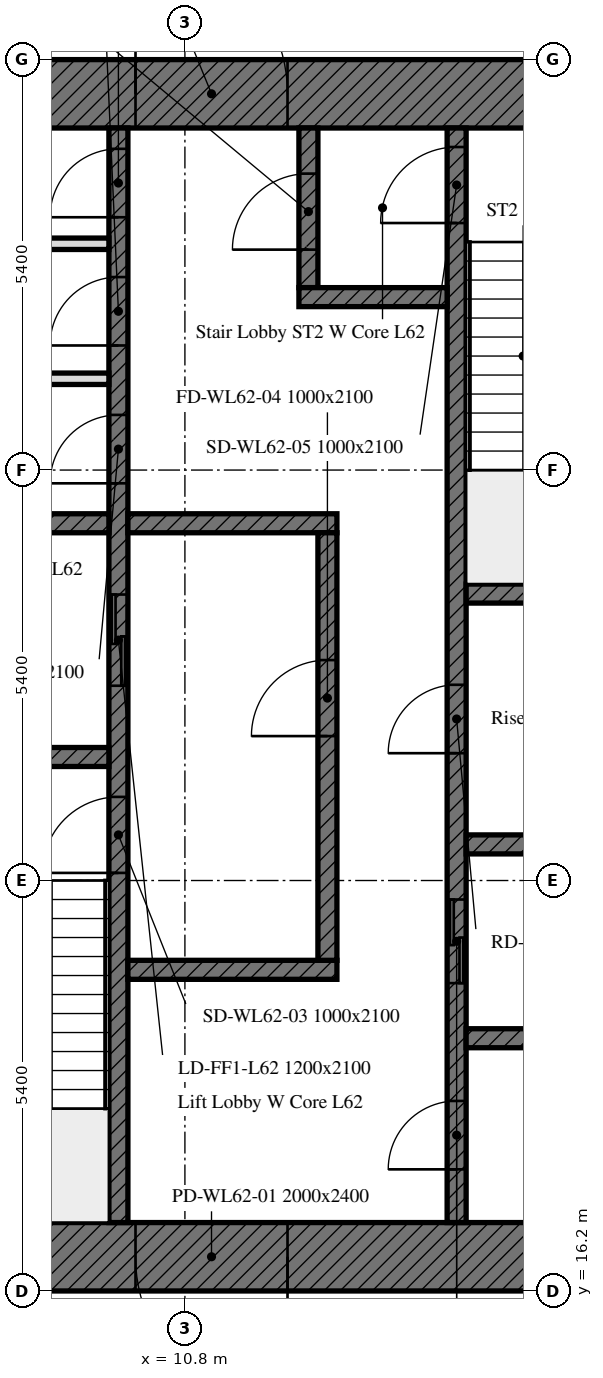
"""IFC4 building model, lengths in metres.
Left out: names, types, materials, properties, quantities, classifications, styles, units other than length and angle.
Written with IfcOpenShell. Run it as: python <this file> out.ifc"""

import sys

from ifc_helpers import new_model, si_unit, direction, frame, frame_2d, origin, place, context, subcontext, project, spatial, rectangle, extrude, element, fill, save


model = new_model("IFC4")
c1 = context("Model", 3, precision=1e-05, world=origin(), true_north=direction((0.0, 1.0)))
c2 = subcontext(c1, "Body", "Model", "MODEL_VIEW")
j1 = project(units=[si_unit("LENGTHUNIT", "METRE"), si_unit("PLANEANGLEUNIT", "RADIAN")], contexts=[c1])
p1 = place(None, origin())
s1 = spatial("IfcSite", under=j1, at=p1, CompositionType="ELEMENT")
p2 = place(p1, origin())
s2 = spatial("IfcBuilding", under=s1, at=p2, CompositionType="ELEMENT")
p3 = place(p2, frame((0.0, 0.0, 255.7)))
s3 = spatial("IfcBuildingStorey", under=s2, at=p3, CompositionType="ELEMENT", Elevation=255.7)
p4 = place(p3, frame((17.7, 16.65, 0.0), z_axis=(0.0, 0.0, 1.0), x_axis=(-1.0, 0.0, 0.0)))
e1 = element("IfcWall", 1, at=p4, inside=s3, PredefinedType="SOLIDWALL", context=c2, shape_type="SweptSolid", body=[
    extrude(rectangle(XDim=11.1, YDim=0.9, at=frame_2d((5.55, 0.0))), origin(), (0.0, 0.0, 1.0), 4.5),
])
p5 = place(p4, frame((5.55, 0.0, 0.0)))
e2 = element("IfcOpeningElement", 2, at=p5, cuts=e1, PredefinedType="OPENING", context=c2, shape_type="SweptSolid", body=[
    extrude(rectangle(XDim=2.0, YDim=2.4, at=frame_2d((1.0, 1.2))), frame((0.0, 0.45, 0.0), z_axis=(0.0, -1.0, 0.0), x_axis=(1.0, 0.0, 0.0)), (0.0, 0.0, 1.0), 0.9),
])
p6 = place(p3, frame((6.6, 31.95, 0.0), z_axis=(0.0, 0.0, 1.0), x_axis=(1.0, 0.0, 0.0)))
e3 = element("IfcWall", 3, at=p6, inside=s3, PredefinedType="SOLIDWALL", context=c2, shape_type="SweptSolid", body=[
    extrude(rectangle(XDim=11.1, YDim=0.9, at=frame_2d((5.55, 0.0))), origin(), (0.0, 0.0, 1.0), 4.5),
])
p7 = place(p6, frame((3.55, 0.0, 0.0)))
e4 = element("IfcOpeningElement", 4, at=p7, cuts=e3, PredefinedType="OPENING", context=c2, shape_type="SweptSolid", body=[
    extrude(rectangle(XDim=2.0, YDim=2.4, at=frame_2d((1.0, 1.2))), frame((0.0, 0.45, 0.0), z_axis=(0.0, -1.0, 0.0), x_axis=(1.0, 0.0, 0.0)), (0.0, 0.0, 1.0), 0.9),
])
p8 = place(p3, frame((9.925, 17.1, 0.0), z_axis=(0.0, 0.0, 1.0), x_axis=(0.0, 1.0, 0.0)))
e5 = element("IfcWall", 5, at=p8, inside=s3, PredefinedType="SOLIDWALL", context=c2, shape_type="SweptSolid", body=[
    extrude(rectangle(XDim=14.4, YDim=0.25, at=frame_2d((7.2, 0.0))), origin(), (0.0, 0.0, 1.0), 4.5),
])
p9 = place(p8, frame((4.6, 0.0, 0.0)))
e6 = element("IfcOpeningElement", 6, at=p9, cuts=e5, PredefinedType="OPENING", context=c2, shape_type="SweptSolid", body=[
    extrude(rectangle(XDim=1.0, YDim=2.1, at=frame_2d((0.5, 1.05))), frame((0.0, 0.125, 0.0), z_axis=(0.0, -1.0, 0.0), x_axis=(1.0, 0.0, 0.0)), (0.0, 0.0, 1.0), 0.25),
])
p10 = place(p8, frame((7.062, 0.0, 0.0)))
e7 = element("IfcOpeningElement", 7, at=p10, cuts=e5, PredefinedType="OPENING", context=c2, shape_type="SweptSolid", body=[
    extrude(rectangle(XDim=1.2, YDim=2.1, at=frame_2d((0.6, 1.05))), frame((0.0, 0.125, 0.0), z_axis=(0.0, -1.0, 0.0), x_axis=(1.0, 0.0, 0.0)), (0.0, 0.0, 1.0), 0.25),
])
p11 = place(p8, frame((9.726, 0.0, 0.0)))
e8 = element("IfcOpeningElement", 8, at=p11, cuts=e5, PredefinedType="OPENING", context=c2, shape_type="SweptSolid", body=[
    extrude(rectangle(XDim=0.9, YDim=2.1, at=frame_2d((0.45, 1.05))), frame((0.0, 0.125, 0.0), z_axis=(0.0, -1.0, 0.0), x_axis=(1.0, 0.0, 0.0)), (0.0, 0.0, 1.0), 0.25),
])
p12 = place(p8, frame((11.539, 0.0, 0.0)))
e9 = element("IfcOpeningElement", 9, at=p12, cuts=e5, PredefinedType="OPENING", context=c2, shape_type="SweptSolid", body=[
    extrude(rectangle(XDim=0.9, YDim=2.1, at=frame_2d((0.45, 1.05))), frame((0.0, 0.125, 0.0), z_axis=(0.0, -1.0, 0.0), x_axis=(1.0, 0.0, 0.0)), (0.0, 0.0, 1.0), 0.25),
])
p13 = place(p8, frame((13.226, 0.0, 0.0)))
e10 = element("IfcOpeningElement", 10, at=p13, cuts=e5, PredefinedType="OPENING", context=c2, shape_type="SweptSolid", body=[
    extrude(rectangle(XDim=0.9, YDim=2.1, at=frame_2d((0.45, 1.05))), frame((0.0, 0.125, 0.0), z_axis=(0.0, -1.0, 0.0), x_axis=(1.0, 0.0, 0.0)), (0.0, 0.0, 1.0), 0.25),
])
p14 = place(p3, frame((14.375, 17.1, 0.0), z_axis=(0.0, 0.0, 1.0), x_axis=(0.0, 1.0, 0.0)))
e11 = element("IfcWall", 11, at=p14, inside=s3, PredefinedType="SOLIDWALL", context=c2, shape_type="SweptSolid", body=[
    extrude(rectangle(XDim=14.4, YDim=0.25, at=frame_2d((7.2, 0.0))), origin(), (0.0, 0.0, 1.0), 4.5),
])
p15 = place(p14, frame((13.15, 0.0, 0.0)))
e12 = element("IfcOpeningElement", 12, at=p15, cuts=e11, PredefinedType="OPENING", context=c2, shape_type="SweptSolid", body=[
    extrude(rectangle(XDim=1.0, YDim=2.1, at=frame_2d((0.5, 1.05))), frame((0.0, 0.125, 0.0), z_axis=(0.0, -1.0, 0.0), x_axis=(1.0, 0.0, 0.0)), (0.0, 0.0, 1.0), 0.25),
])
p16 = place(p14, frame((3.15, 0.0, 0.0)))
e13 = element("IfcOpeningElement", 13, at=p16, cuts=e11, PredefinedType="OPENING", context=c2, shape_type="SweptSolid", body=[
    extrude(rectangle(XDim=1.1, YDim=2.1, at=frame_2d((0.55, 1.05))), frame((0.0, 0.125, 0.0), z_axis=(0.0, -1.0, 0.0), x_axis=(1.0, 0.0, 0.0)), (0.0, 0.0, 1.0), 0.25),
])
p17 = place(p14, frame((0.7, 0.0, 0.0)))
e14 = element("IfcOpeningElement", 14, at=p17, cuts=e11, PredefinedType="OPENING", context=c2, shape_type="SweptSolid", body=[
    extrude(rectangle(XDim=0.9, YDim=2.1, at=frame_2d((0.45, 1.05))), frame((0.0, 0.125, 0.0), z_axis=(0.0, -1.0, 0.0), x_axis=(1.0, 0.0, 0.0)), (0.0, 0.0, 1.0), 0.25),
])
p18 = place(p14, frame((6.175, 0.0, 0.0)))
e15 = element("IfcOpeningElement", 15, at=p18, cuts=e11, PredefinedType="OPENING", context=c2, shape_type="SweptSolid", body=[
    extrude(rectangle(XDim=0.9, YDim=2.1, at=frame_2d((0.45, 1.05))), frame((0.0, 0.125, 0.0), z_axis=(0.0, -1.0, 0.0), x_axis=(1.0, 0.0, 0.0)), (0.0, 0.0, 1.0), 0.25),
])
for number, where, z_axis, x_axis in (
    (16, (6.6, 23.225, 0.0), (0.0, 0.0, 1.0), (1.0, 0.0, 0.0)),
    (17, (14.5, 25.375, 0.0), (0.0, 0.0, 1.0), (1.0, 0.0, 0.0)),
    (18, (14.5, 22.075, 0.0), (0.0, 0.0, 1.0), (1.0, 0.0, 0.0)),
    (19, (6.6, 26.3, 0.0), (0.0, 0.0, 1.0), (1.0, 0.0, 0.0)),
):
    element("IfcWall", number, at=place(p3, frame(where, z_axis=z_axis, x_axis=x_axis)), inside=s3, PredefinedType="SOLIDWALL", context=c2, shape_type="SweptSolid", body=[
        extrude(rectangle(XDim=3.2, YDim=0.25, at=frame_2d((1.6, 0.0))), origin(), (0.0, 0.0, 1.0), 4.5),
    ])
for number, where, z_axis, x_axis in (
    (20, (10.05, 26.3, 0.0), (0.0, 0.0, 1.0), (1.0, 0.0, 0.0)),
    (21, (10.05, 20.425, 0.0), (0.0, 0.0, 1.0), (1.0, 0.0, 0.0)),
):
    element("IfcWall", number, at=place(p3, frame(where, z_axis=z_axis, x_axis=x_axis)), inside=s3, PredefinedType="SOLIDWALL", context=c2, shape_type="SweptSolid", body=[
        extrude(rectangle(XDim=2.75, YDim=0.25, at=frame_2d((1.375, 0.0))), origin(), (0.0, 0.0, 1.0), 4.5),
    ])
p19 = place(p3, frame((12.425, 29.4, 0.0), z_axis=(0.0, 0.0, 1.0), x_axis=(0.0, 1.0, 0.0)))
e22 = element("IfcWall", 22, at=p19, inside=s3, PredefinedType="SOLIDWALL", context=c2, shape_type="SweptSolid", body=[
    extrude(rectangle(XDim=2.1, YDim=0.25, at=frame_2d((1.05, 0.0))), origin(), (0.0, 0.0, 1.0), 4.5),
])
p20 = place(p19, frame((0.5, 0.0, 0.0)))
e23 = element("IfcOpeningElement", 23, at=p20, cuts=e22, PredefinedType="OPENING", context=c2, shape_type="SweptSolid", body=[
    extrude(rectangle(XDim=1.0, YDim=2.1, at=frame_2d((0.5, 1.05))), frame((0.0, 0.125, 0.0), z_axis=(0.0, -1.0, 0.0), x_axis=(1.0, 0.0, 0.0)), (0.0, 0.0, 1.0), 0.25),
])
p21 = place(p3, frame((12.3, 29.275, 0.0), z_axis=(0.0, 0.0, 1.0), x_axis=(1.0, 0.0, 0.0)))
e24 = element("IfcWall", 24, at=p21, inside=s3, PredefinedType="SOLIDWALL", context=c2, shape_type="SweptSolid", body=[
    extrude(rectangle(XDim=1.95, YDim=0.25, at=frame_2d((0.975, 0.0))), origin(), (0.0, 0.0, 1.0), 4.5),
])
p22 = place(p3, frame((12.675, 20.55, 0.0), z_axis=(0.0, 0.0, 1.0), x_axis=(0.0, 1.0, 0.0)))
e25 = element("IfcWall", 25, at=p22, inside=s3, PredefinedType="SOLIDWALL", context=c2, shape_type="SweptSolid", body=[
    extrude(rectangle(XDim=5.625, YDim=0.25, at=frame_2d((2.812, 0.0))), origin(), (0.0, 0.0, 1.0), 4.5),
])
p23 = place(p22, frame((2.95, 0.0, 0.0)))
e26 = element("IfcOpeningElement", 26, at=p23, cuts=e25, PredefinedType="OPENING", context=c2, shape_type="SweptSolid", body=[
    extrude(rectangle(XDim=1.0, YDim=2.1, at=frame_2d((0.5, 1.05))), frame((0.0, 0.125, 0.0), z_axis=(0.0, -1.0, 0.0), x_axis=(1.0, 0.0, 0.0)), (0.0, 0.0, 1.0), 0.25),
])
p24 = place(p3, frame((14.5, 19.525, 0.0), z_axis=(0.0, 0.0, 1.0), x_axis=(1.0, 0.0, 0.0)))
e27 = element("IfcWall", 27, at=p24, inside=s3, PredefinedType="SOLIDWALL", context=c2, shape_type="SweptSolid", body=[
    extrude(rectangle(XDim=3.2, YDim=0.25, at=frame_2d((1.6, 0.0))), origin(), (0.0, 0.0, 1.0), 4.5),
])
for number, where, z_axis, x_axis in (
    (28, (6.6, 28.201, 0.0), (0.0, 0.0, 1.0), (1.0, 0.0, 0.0)),
    (29, (6.6, 29.977, 0.0), (0.0, 0.0, 1.0), (1.0, 0.0, 0.0)),
):
    element("IfcWall", number, at=place(p3, frame(where, z_axis=z_axis, x_axis=x_axis)), inside=s3, PredefinedType="PARTITIONING", context=c2, shape_type="SweptSolid", body=[
        extrude(rectangle(XDim=3.2, YDim=0.15, at=frame_2d((1.6, 0.0))), origin(), (0.0, 0.0, 1.0), 4.5),
    ])
p25 = place(p5, origin())
e30 = element("IfcDoor", 30, at=p25, inside=s3, OperationType="DOUBLE_DOOR_SINGLE_SWING", PredefinedType="DOOR", context=c2, shape_type="SweptSolid", body=[
    extrude(rectangle(XDim=2.0, YDim=2.4, at=frame_2d((1.0, 1.2))), frame((0.0, 0.025, 0.0), z_axis=(0.0, -1.0, 0.0), x_axis=(1.0, 0.0, 0.0)), (0.0, 0.0, 1.0), 0.05),
])
fill(e2, e30)
p26 = place(p7, origin())
e31 = element("IfcDoor", 31, at=p26, inside=s3, OperationType="DOUBLE_DOOR_SINGLE_SWING", PredefinedType="DOOR", context=c2, shape_type="SweptSolid", body=[
    extrude(rectangle(XDim=2.0, YDim=2.4, at=frame_2d((1.0, 1.2))), frame((0.0, 0.025, 0.0), z_axis=(0.0, -1.0, 0.0), x_axis=(1.0, 0.0, 0.0)), (0.0, 0.0, 1.0), 0.05),
])
fill(e4, e31)
p27 = place(p9, origin())
e32 = element("IfcDoor", 32, at=p27, inside=s3, OperationType="SINGLE_SWING_LEFT", PredefinedType="DOOR", context=c2, shape_type="SweptSolid", body=[
    extrude(rectangle(XDim=1.0, YDim=2.1, at=frame_2d((0.5, 1.05))), frame((0.0, 0.025, 0.0), z_axis=(0.0, -1.0, 0.0), x_axis=(1.0, 0.0, 0.0)), (0.0, 0.0, 1.0), 0.05),
])
fill(e6, e32)
p28 = place(p23, origin())
e33 = element("IfcDoor", 33, at=p28, inside=s3, OperationType="SINGLE_SWING_LEFT", PredefinedType="DOOR", context=c2, shape_type="SweptSolid", body=[
    extrude(rectangle(XDim=1.0, YDim=2.1, at=frame_2d((0.5, 1.05))), frame((0.0, 0.025, 0.0), z_axis=(0.0, -1.0, 0.0), x_axis=(1.0, 0.0, 0.0)), (0.0, 0.0, 1.0), 0.05),
])
fill(e26, e33)
p29 = place(p15, origin())
e34 = element("IfcDoor", 34, at=p29, inside=s3, OperationType="SINGLE_SWING_LEFT", PredefinedType="DOOR", context=c2, shape_type="SweptSolid", body=[
    extrude(rectangle(XDim=1.0, YDim=2.1, at=frame_2d((0.5, 1.05))), frame((0.0, 0.025, 0.0), z_axis=(0.0, -1.0, 0.0), x_axis=(1.0, 0.0, 0.0)), (0.0, 0.0, 1.0), 0.05),
])
fill(e12, e34)
p30 = place(p20, origin())
e35 = element("IfcDoor", 35, at=p30, inside=s3, OperationType="SINGLE_SWING_LEFT", PredefinedType="DOOR", context=c2, shape_type="SweptSolid", body=[
    extrude(rectangle(XDim=1.0, YDim=2.1, at=frame_2d((0.5, 1.05))), frame((0.0, 0.025, 0.0), z_axis=(0.0, -1.0, 0.0), x_axis=(1.0, 0.0, 0.0)), (0.0, 0.0, 1.0), 0.05),
])
fill(e23, e35)
p31 = place(p10, origin())
e36 = element("IfcDoor", 36, at=p31, inside=s3, OperationType="DOUBLE_DOOR_SLIDING", PredefinedType="DOOR", context=c2, shape_type="SweptSolid", body=[
    extrude(rectangle(XDim=1.2, YDim=2.1, at=frame_2d((0.6, 1.05))), frame((0.0, 0.025, 0.0), z_axis=(0.0, -1.0, 0.0), x_axis=(1.0, 0.0, 0.0)), (0.0, 0.0, 1.0), 0.05),
])
fill(e7, e36)
p32 = place(p16, origin())
e37 = element("IfcDoor", 37, at=p32, inside=s3, OperationType="DOUBLE_DOOR_SLIDING", PredefinedType="DOOR", context=c2, shape_type="SweptSolid", body=[
    extrude(rectangle(XDim=1.1, YDim=2.1, at=frame_2d((0.55, 1.05))), frame((0.0, 0.025, 0.0), z_axis=(0.0, -1.0, 0.0), x_axis=(1.0, 0.0, 0.0)), (0.0, 0.0, 1.0), 0.05),
])
fill(e13, e37)
p33 = place(p11, origin())
e38 = element("IfcDoor", 38, at=p33, inside=s3, OperationType="SINGLE_SWING_LEFT", PredefinedType="DOOR", context=c2, shape_type="SweptSolid", body=[
    extrude(rectangle(XDim=0.9, YDim=2.1, at=frame_2d((0.45, 1.05))), frame((0.0, 0.025, 0.0), z_axis=(0.0, -1.0, 0.0), x_axis=(1.0, 0.0, 0.0)), (0.0, 0.0, 1.0), 0.05),
])
fill(e8, e38)
p34 = place(p12, origin())
e39 = element("IfcDoor", 39, at=p34, inside=s3, OperationType="SINGLE_SWING_LEFT", PredefinedType="DOOR", context=c2, shape_type="SweptSolid", body=[
    extrude(rectangle(XDim=0.9, YDim=2.1, at=frame_2d((0.45, 1.05))), frame((0.0, 0.025, 0.0), z_axis=(0.0, -1.0, 0.0), x_axis=(1.0, 0.0, 0.0)), (0.0, 0.0, 1.0), 0.05),
])
fill(e9, e39)
p35 = place(p13, origin())
e40 = element("IfcDoor", 40, at=p35, inside=s3, OperationType="SINGLE_SWING_LEFT", PredefinedType="DOOR", context=c2, shape_type="SweptSolid", body=[
    extrude(rectangle(XDim=0.9, YDim=2.1, at=frame_2d((0.45, 1.05))), frame((0.0, 0.025, 0.0), z_axis=(0.0, -1.0, 0.0), x_axis=(1.0, 0.0, 0.0)), (0.0, 0.0, 1.0), 0.05),
])
fill(e10, e40)
p36 = place(p17, origin())
e41 = element("IfcDoor", 41, at=p36, inside=s3, OperationType="SINGLE_SWING_LEFT", PredefinedType="DOOR", context=c2, shape_type="SweptSolid", body=[
    extrude(rectangle(XDim=0.9, YDim=2.1, at=frame_2d((0.45, 1.05))), frame((0.0, 0.025, 0.0), z_axis=(0.0, -1.0, 0.0), x_axis=(1.0, 0.0, 0.0)), (0.0, 0.0, 1.0), 0.05),
])
fill(e14, e41)
p37 = place(p18, origin())
e42 = element("IfcDoor", 42, at=p37, inside=s3, OperationType="SINGLE_SWING_LEFT", PredefinedType="DOOR", context=c2, shape_type="SweptSolid", body=[
    extrude(rectangle(XDim=0.9, YDim=2.1, at=frame_2d((0.45, 1.05))), frame((0.0, 0.025, 0.0), z_axis=(0.0, -1.0, 0.0), x_axis=(1.0, 0.0, 0.0)), (0.0, 0.0, 1.0), 0.05),
])
fill(e15, e42)
save(model, sys.argv[1])
